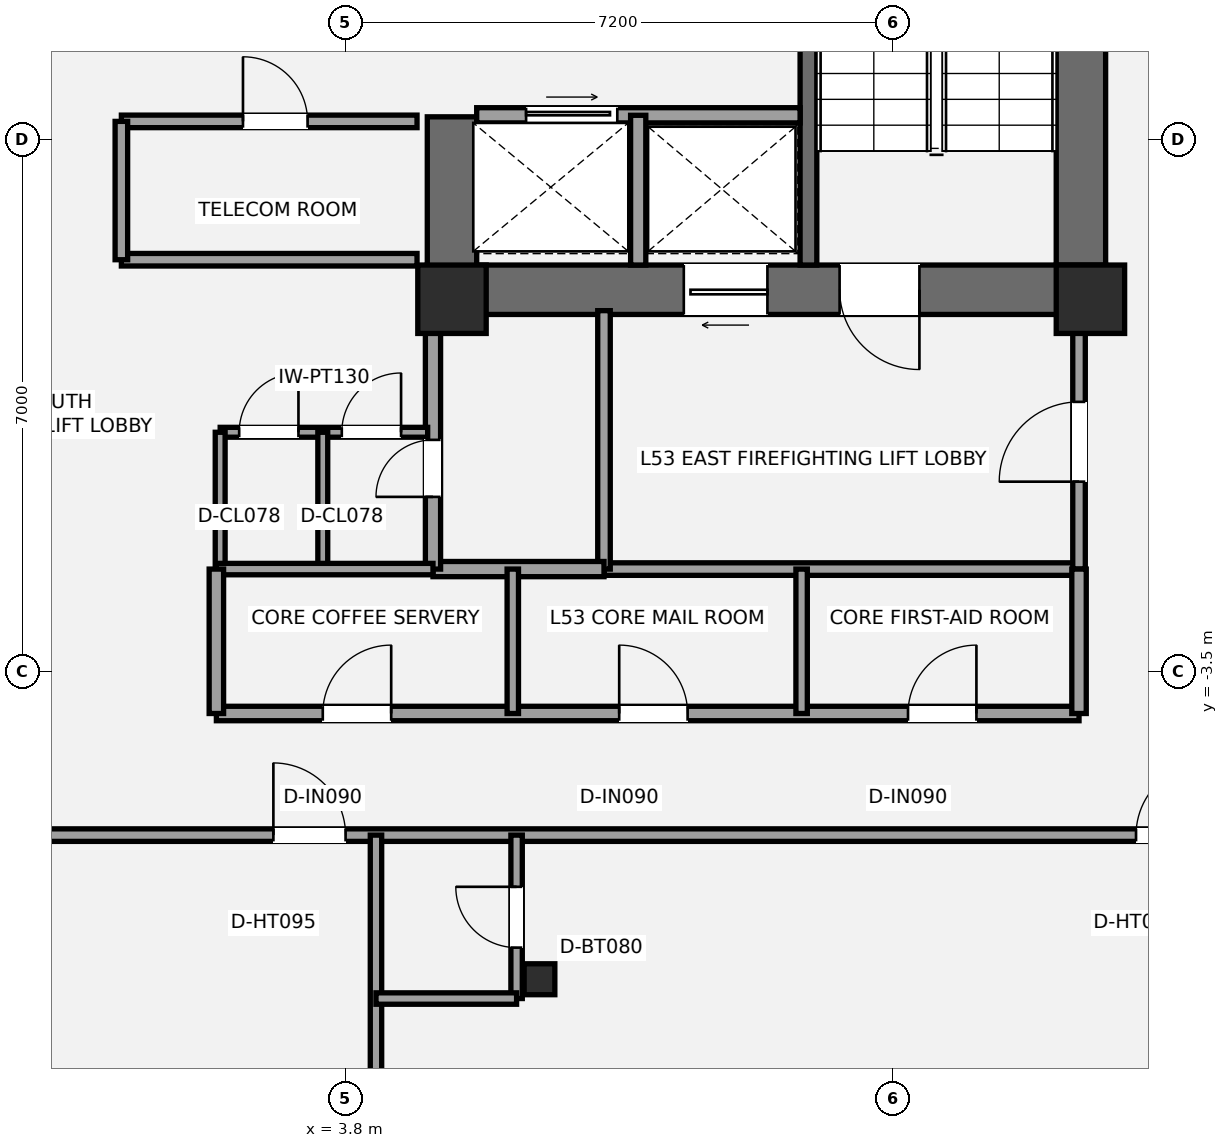
"""IFC4 building model, lengths in metres.
Left out: names, types, materials, properties, quantities, classifications, styles, units other than length and angle.
Written with IfcOpenShell. Run it as: python <this file> out.ifc"""

import sys

from ifc_helpers import new_model, si_unit, direction, frame, frame_2d, origin, origin_2d, place, context, subcontext, project, spatial, rectangle, i_section, extrude, element, fill, save


model = new_model("IFC4")
c1 = context("Model", 3, precision=1e-05, world=origin(), true_north=direction((0.0, 1.0)))
c2 = subcontext(c1, "Body", "Model", "MODEL_VIEW")
j1 = project(units=[si_unit("LENGTHUNIT", "METRE"), si_unit("PLANEANGLEUNIT", "RADIAN")], contexts=[c1])
p1 = place(None, origin())
s1 = spatial("IfcSite", under=j1, at=p1, CompositionType="ELEMENT")
p2 = place(p1, origin())
s2 = spatial("IfcBuilding", under=s1, at=p2, CompositionType="ELEMENT")
p3 = place(p2, frame((0.0, 0.0, 191.8)))
s3 = spatial("IfcBuildingStorey", under=s2, at=p3, CompositionType="ELEMENT", Elevation=191.8)
p4 = place(p3, frame((13.475, 1.2, 0.0), z_axis=(0.0, 0.0, 1.0), x_axis=(0.0, 1.0, 0.0)))
e1 = element("IfcWall", 1, at=p4, inside=s3, PredefinedType="SHEAR", context=c2, shape_type="SweptSolid", body=[
    extrude(rectangle(XDim=8.45, YDim=0.65, at=frame_2d((4.225, 0.0))), origin(), (0.0, 0.0, 1.0), 3.2),
])
p5 = place(p3, frame((13.8, 1.525, 0.0), z_axis=(0.0, 0.0, 1.0), x_axis=(-1.0, 0.0, 0.0)))
e2 = element("IfcWall", 2, at=p5, inside=s3, PredefinedType="SHEAR", context=c2, shape_type="SweptSolid", body=[
    extrude(rectangle(XDim=8.925, YDim=0.65, at=frame_2d((4.462, 0.0))), origin(), (0.0, 0.0, 1.0), 3.2),
])
p6 = place(p5, frame((2.45, 0.0, 0.0)))
e3 = element("IfcOpeningElement", 3, at=p6, cuts=e2, PredefinedType="OPENING", context=c2, shape_type="SweptSolid", body=[
    extrude(rectangle(XDim=1.05, YDim=2.15, at=frame_2d((0.525, 1.075))), frame((0.0, 0.335, 0.0), z_axis=(0.0, -1.0, 0.0), x_axis=(1.0, 0.0, 0.0)), (0.0, 0.0, 1.0), 0.67),
])
p7 = place(p5, frame((4.45, 0.0, 0.0)))
e4 = element("IfcOpeningElement", 4, at=p7, cuts=e2, PredefinedType="OPENING", context=c2, shape_type="SweptSolid", body=[
    extrude(rectangle(XDim=1.1, YDim=2.2, at=frame_2d((0.55, 1.1))), frame((0.0, 0.335, 0.0), z_axis=(0.0, -1.0, 0.0), x_axis=(1.0, 0.0, 0.0)), (0.0, 0.0, 1.0), 0.67),
])
p8 = place(p3, frame((5.2, 1.2, 0.0), z_axis=(0.0, 0.0, 1.0), x_axis=(0.0, 1.0, 0.0)))
e5 = element("IfcWall", 5, at=p8, inside=s3, PredefinedType="SHEAR", context=c2, shape_type="SweptSolid", body=[
    extrude(rectangle(XDim=2.6, YDim=0.65, at=frame_2d((1.3, 0.0))), origin(), (0.0, 0.0, 1.0), 3.2),
])
p9 = place(p3, frame((9.89, 1.85, 0.0), z_axis=(0.0, 0.0, 1.0), x_axis=(0.0, 1.0, 0.0)))
e6 = element("IfcWall", 6, at=p9, inside=s3, PredefinedType="SHEAR", context=c2, shape_type="SweptSolid", body=[
    extrude(rectangle(XDim=7.15, YDim=0.22, at=frame_2d((3.575, 0.0))), origin(), (0.0, 0.0, 1.0), 3.2),
])
for number, where, z_axis, x_axis in (
    (7, (5.2, 1.4, 0.0), (0.0, 0.0, 1.0), (1.0, 0.0, 0.0)),
    (8, (13.6, 1.4, 0.0), (0.0, 0.0, 1.0), (1.0, 0.0, 0.0)),
):
    element("IfcColumn", number, at=place(p3, frame(where, z_axis=z_axis, x_axis=x_axis)), inside=s3, PredefinedType="COLUMN", context=c2, shape_type="SweptSolid", body=[
        extrude(rectangle(XDim=0.9, YDim=0.9, at=origin_2d()), origin(), (0.0, 0.0, 1.0), 3.2),
    ])
p10 = place(p3, frame((6.351, -7.546, 0.0), z_axis=(0.0, 0.0, 1.0), x_axis=(1.0, 0.0, 0.0)))
e9 = element("IfcColumn", 9, at=p10, inside=s3, PredefinedType="COLUMN", context=c2, shape_type="SweptSolid", body=[
    extrude(i_section(OverallWidth=0.404, OverallDepth=0.407, WebThickness=0.027, FlangeThickness=0.044, at=origin_2d()), origin(), (0.0, 0.0, 1.0), 3.2),
])
p11 = place(p3, frame((7.2, -2.15, 0.0), z_axis=(0.0, 0.0, 1.0), x_axis=(1.0, 0.0, 0.0)))
e10 = element("IfcWall", 10, at=p11, inside=s3, PredefinedType="PARTITIONING", context=c2, shape_type="SweptSolid", body=[
    extrude(rectangle(XDim=6.25, YDim=0.165, at=frame_2d((3.125, 0.0))), origin(), (0.0, 0.0, 1.0), 3.02),
])
p12 = place(p3, frame((7.2, -2.15, 0.0), z_axis=(0.0, 0.0, 1.0), x_axis=(0.0, 1.0, 0.0)))
e11 = element("IfcWall", 11, at=p12, inside=s3, PredefinedType="PARTITIONING", context=c2, shape_type="SweptSolid", body=[
    extrude(rectangle(XDim=3.4, YDim=0.165, at=frame_2d((1.7, 0.0))), origin(), (0.0, 0.0, 1.0), 2.473),
])
p13 = place(p3, frame((13.45, -2.15, 0.0), z_axis=(0.0, 0.0, 1.0), x_axis=(0.0, 1.0, 0.0)))
e12 = element("IfcWall", 12, at=p13, inside=s3, PredefinedType="PARTITIONING", context=c2, shape_type="SweptSolid", body=[
    extrude(rectangle(XDim=3.4, YDim=0.165, at=frame_2d((1.7, 0.0))), origin(), (0.0, 0.0, 1.0), 2.473),
])
p14 = place(p13, frame((1.15, 0.0, 0.0)))
e13 = element("IfcOpeningElement", 13, at=p14, cuts=e12, PredefinedType="OPENING", context=c2, shape_type="SweptSolid", body=[
    extrude(rectangle(XDim=1.05, YDim=2.15, at=frame_2d((0.525, 1.075))), frame((0.0, 0.093, 0.0), z_axis=(0.0, -1.0, 0.0), x_axis=(1.0, 0.0, 0.0)), (0.0, 0.0, 1.0), 0.185),
])
p15 = place(p3, frame((4.95, -2.15, 0.0), z_axis=(0.0, 0.0, 1.0), x_axis=(1.0, 0.0, 0.0)))
e14 = element("IfcWall", 14, at=p15, inside=s3, PredefinedType="SOLIDWALL", context=c2, shape_type="SweptSolid", body=[
    extrude(rectangle(XDim=2.25, YDim=0.2, at=frame_2d((1.125, 0.0))), origin(), (0.0, 0.0, 1.0), 3.02),
])
p16 = place(p3, frame((4.95, -2.15, 0.0), z_axis=(0.0, 0.0, 1.0), x_axis=(0.0, 1.0, 0.0)))
e15 = element("IfcWall", 15, at=p16, inside=s3, PredefinedType="SOLIDWALL", context=c2, shape_type="SweptSolid", body=[
    extrude(rectangle(XDim=3.4, YDim=0.2, at=frame_2d((1.7, 0.0))), origin(), (0.0, 0.0, 1.0), 2.473),
])
p17 = place(p16, frame((0.95, 0.0, 0.0)))
e16 = element("IfcOpeningElement", 16, at=p17, cuts=e15, PredefinedType="OPENING", context=c2, shape_type="SweptSolid", body=[
    extrude(rectangle(XDim=0.75, YDim=2.1, at=frame_2d((0.375, 1.05))), frame((0.0, 0.11, 0.0), z_axis=(0.0, -1.0, 0.0), x_axis=(1.0, 0.0, 0.0)), (0.0, 0.0, 1.0), 0.22),
])
p18 = place(p3, frame((2.15, -0.35, 0.0), z_axis=(0.0, 0.0, 1.0), x_axis=(1.0, 0.0, 0.0)))
e17 = element("IfcWall", 17, at=p18, inside=s3, PredefinedType="PARTITIONING", context=c2, shape_type="SweptSolid", body=[
    extrude(rectangle(XDim=2.73, YDim=0.13, at=frame_2d((1.365, 0.0))), origin(), (0.0, 0.0, 1.0), 3.02),
])
p19 = place(p18, frame((0.25, 0.0, 0.0)))
e18 = element("IfcOpeningElement", 18, at=p19, cuts=e17, PredefinedType="OPENING", context=c2, shape_type="SweptSolid", body=[
    extrude(rectangle(XDim=0.78, YDim=2.1, at=frame_2d((0.39, 1.05))), frame((0.0, 0.075, 0.0), z_axis=(0.0, -1.0, 0.0), x_axis=(1.0, 0.0, 0.0)), (0.0, 0.0, 1.0), 0.15),
])
p20 = place(p18, frame((1.6, 0.0, 0.0)))
e19 = element("IfcOpeningElement", 19, at=p20, cuts=e17, PredefinedType="OPENING", context=c2, shape_type="SweptSolid", body=[
    extrude(rectangle(XDim=0.78, YDim=2.1, at=frame_2d((0.39, 1.05))), frame((0.0, 0.075, 0.0), z_axis=(0.0, -1.0, 0.0), x_axis=(1.0, 0.0, 0.0)), (0.0, 0.0, 1.0), 0.15),
])
for number, where, z_axis, x_axis in (
    (20, (2.15, -2.15, 0.0), (0.0, 0.0, 1.0), (0.0, 1.0, 0.0)),
    (21, (3.5, -2.15, 0.0), (0.0, 0.0, 1.0), (0.0, 1.0, 0.0)),
):
    element("IfcWall", number, at=place(p3, frame(where, z_axis=z_axis, x_axis=x_axis)), inside=s3, PredefinedType="PARTITIONING", context=c2, shape_type="SweptSolid", body=[
        extrude(rectangle(XDim=1.8, YDim=0.13, at=frame_2d((0.9, 0.0))), origin(), (0.0, 0.0, 1.0), 3.02),
    ])
p21 = place(p3, frame((5.525, 3.82, 0.0), z_axis=(0.0, 0.0, 1.0), x_axis=(1.0, 0.0, 0.0)))
e22 = element("IfcWall", 22, at=p21, inside=s3, PredefinedType="SOLIDWALL", context=c2, shape_type="SweptSolid", body=[
    extrude(rectangle(XDim=4.255, YDim=0.2, at=frame_2d((2.127, 0.0))), origin(), (0.0, 0.0, 1.0), 3.02),
])
p22 = place(p21, frame((0.65, 0.0, 0.0)))
e23 = element("IfcOpeningElement", 23, at=p22, cuts=e22, PredefinedType="OPENING", context=c2, shape_type="SweptSolid", body=[
    extrude(rectangle(XDim=1.2, YDim=2.2, at=frame_2d((0.6, 1.1))), frame((0.0, 0.11, 0.0), z_axis=(0.0, -1.0, 0.0), x_axis=(1.0, 0.0, 0.0)), (0.0, 0.0, 1.0), 0.22),
])
p23 = place(p3, frame((7.65, 1.85, 0.0), z_axis=(0.0, 0.0, 1.0), x_axis=(0.0, 1.0, 0.0)))
e24 = element("IfcWall", 24, at=p23, inside=s3, PredefinedType="SOLIDWALL", context=c2, shape_type="SweptSolid", body=[
    extrude(rectangle(XDim=1.97, YDim=0.2, at=frame_2d((0.985, 0.0))), origin(), (0.0, 0.0, 1.0), 3.02),
])
p24 = place(p3, frame((0.85, 1.92, 0.0), z_axis=(0.0, 0.0, 1.0), x_axis=(1.0, 0.0, 0.0)))
e25 = element("IfcWall", 25, at=p24, inside=s3, PredefinedType="PARTITIONING", context=c2, shape_type="SweptSolid", body=[
    extrude(rectangle(XDim=3.89, YDim=0.165, at=frame_2d((1.945, 0.0))), origin(), (0.0, 0.0, 1.0), 2.16),
])
p25 = place(p3, frame((0.85, 3.74, 0.0), z_axis=(0.0, 0.0, 1.0), x_axis=(1.0, 0.0, 0.0)))
e26 = element("IfcWall", 26, at=p25, inside=s3, PredefinedType="PARTITIONING", context=c2, shape_type="SweptSolid", body=[
    extrude(rectangle(XDim=3.89, YDim=0.165, at=frame_2d((1.945, 0.0))), origin(), (0.0, 0.0, 1.0), 3.02),
])
p26 = place(p25, frame((1.6, 0.0, 0.0)))
e27 = element("IfcOpeningElement", 27, at=p26, cuts=e26, PredefinedType="OPENING", context=c2, shape_type="SweptSolid", body=[
    extrude(rectangle(XDim=0.85, YDim=2.1, at=frame_2d((0.425, 1.05))), frame((0.0, 0.093, 0.0), z_axis=(0.0, -1.0, 0.0), x_axis=(1.0, 0.0, 0.0)), (0.0, 0.0, 1.0), 0.185),
])
p27 = place(p3, frame((0.85, 1.92, 0.0), z_axis=(0.0, 0.0, 1.0), x_axis=(0.0, 1.0, 0.0)))
e28 = element("IfcWall", 28, at=p27, inside=s3, PredefinedType="PARTITIONING", context=c2, shape_type="SweptSolid", body=[
    extrude(rectangle(XDim=1.82, YDim=0.165, at=frame_2d((0.91, 0.0))), origin(), (0.0, 0.0, 1.0), 3.02),
])
p28 = place(p3, frame((2.1, -4.05, 0.0), z_axis=(0.0, 0.0, 1.0), x_axis=(1.0, 0.0, 0.0)))
e29 = element("IfcWall", 29, at=p28, inside=s3, PredefinedType="PLUMBINGWALL", context=c2, shape_type="SweptSolid", body=[
    extrude(rectangle(XDim=11.35, YDim=0.19, at=frame_2d((5.675, 0.0))), origin(), (0.0, 0.0, 1.0), 2.555),
])
p29 = place(p28, frame((1.4, 0.0, 0.0)))
e30 = element("IfcOpeningElement", 30, at=p29, cuts=e29, PredefinedType="OPENING", context=c2, shape_type="SweptSolid", body=[
    extrude(rectangle(XDim=0.9, YDim=2.1, at=frame_2d((0.45, 1.05))), frame((0.0, 0.105, 0.0), z_axis=(0.0, -1.0, 0.0), x_axis=(1.0, 0.0, 0.0)), (0.0, 0.0, 1.0), 0.21),
])
p30 = place(p28, frame((5.3, 0.0, 0.0)))
e31 = element("IfcOpeningElement", 31, at=p30, cuts=e29, PredefinedType="OPENING", context=c2, shape_type="SweptSolid", body=[
    extrude(rectangle(XDim=0.9, YDim=2.1, at=frame_2d((0.45, 1.05))), frame((0.0, 0.105, 0.0), z_axis=(0.0, -1.0, 0.0), x_axis=(1.0, 0.0, 0.0)), (0.0, 0.0, 1.0), 0.21),
])
p31 = place(p28, frame((9.1, 0.0, 0.0)))
e32 = element("IfcOpeningElement", 32, at=p31, cuts=e29, PredefinedType="OPENING", context=c2, shape_type="SweptSolid", body=[
    extrude(rectangle(XDim=0.9, YDim=2.1, at=frame_2d((0.45, 1.05))), frame((0.0, 0.105, 0.0), z_axis=(0.0, -1.0, 0.0), x_axis=(1.0, 0.0, 0.0)), (0.0, 0.0, 1.0), 0.21),
])
p32 = place(p3, frame((2.1, -2.15, 0.0), z_axis=(0.0, 0.0, 1.0), x_axis=(1.0, 0.0, 0.0)))
e33 = element("IfcWall", 33, at=p32, inside=s3, PredefinedType="PLUMBINGWALL", context=c2, shape_type="SweptSolid", body=[
    extrude(rectangle(XDim=2.85, YDim=0.15, at=frame_2d((1.425, 0.0))), origin(), (0.0, 0.0, 1.0), 3.02),
])
p33 = place(p3, frame((2.1, -4.05, 0.0), z_axis=(0.0, 0.0, 1.0), x_axis=(0.0, 1.0, 0.0)))
e34 = element("IfcWall", 34, at=p33, inside=s3, PredefinedType="PLUMBINGWALL", context=c2, shape_type="SweptSolid", body=[
    extrude(rectangle(XDim=1.9, YDim=0.19, at=frame_2d((0.95, 0.0))), origin(), (0.0, 0.0, 1.0), 3.02),
])
p34 = place(p3, frame((13.45, -4.05, 0.0), z_axis=(0.0, 0.0, 1.0), x_axis=(0.0, 1.0, 0.0)))
e35 = element("IfcWall", 35, at=p34, inside=s3, PredefinedType="PLUMBINGWALL", context=c2, shape_type="SweptSolid", body=[
    extrude(rectangle(XDim=1.9, YDim=0.19, at=frame_2d((0.95, 0.0))), origin(), (0.0, 0.0, 1.0), 2.473),
])
for number, where, z_axis, x_axis in (
    (36, (6.0, -4.05, 0.0), (0.0, 0.0, 1.0), (0.0, 1.0, 0.0)),
    (37, (9.8, -4.05, 0.0), (0.0, 0.0, 1.0), (0.0, 1.0, 0.0)),
):
    element("IfcWall", number, at=place(p3, frame(where, z_axis=z_axis, x_axis=x_axis)), inside=s3, PredefinedType="PLUMBINGWALL", context=c2, shape_type="SweptSolid", body=[
        extrude(rectangle(XDim=1.9, YDim=0.15, at=frame_2d((0.95, 0.0))), origin(), (0.0, 0.0, 1.0), 2.473),
    ])
p35 = place(p3, frame((-16.1, -5.65, 0.0), z_axis=(0.0, 0.0, 1.0), x_axis=(1.0, 0.0, 0.0)))
e38 = element("IfcWall", 38, at=p35, inside=s3, PredefinedType="PARTITIONING", context=c2, shape_type="SweptSolid", body=[
    extrude(rectangle(XDim=31.65, YDim=0.165, at=frame_2d((15.825, 0.0))), origin(), (0.0, 0.0, 1.0), 2.398),
])
p36 = place(p35, frame((8.95, 0.0, 0.0)))
e39 = element("IfcOpeningElement", 39, at=p36, cuts=e38, PredefinedType="OPENING", context=c2, shape_type="SweptSolid", body=[
    extrude(rectangle(XDim=0.95, YDim=2.15, at=frame_2d((0.475, 1.075))), frame((0.0, 0.093, 0.0), z_axis=(0.0, -1.0, 0.0), x_axis=(1.0, 0.0, 0.0)), (0.0, 0.0, 1.0), 0.185),
])
p37 = place(p35, frame((18.95, 0.0, 0.0)))
e40 = element("IfcOpeningElement", 40, at=p37, cuts=e38, PredefinedType="OPENING", context=c2, shape_type="SweptSolid", body=[
    extrude(rectangle(XDim=0.95, YDim=2.15, at=frame_2d((0.475, 1.075))), frame((0.0, 0.093, 0.0), z_axis=(0.0, -1.0, 0.0), x_axis=(1.0, 0.0, 0.0)), (0.0, 0.0, 1.0), 0.185),
])
p38 = place(p35, frame((30.3, 0.0, 0.0)))
e41 = element("IfcOpeningElement", 41, at=p38, cuts=e38, PredefinedType="OPENING", context=c2, shape_type="SweptSolid", body=[
    extrude(rectangle(XDim=0.95, YDim=2.15, at=frame_2d((0.475, 1.075))), frame((0.0, 0.093, 0.0), z_axis=(0.0, -1.0, 0.0), x_axis=(1.0, 0.0, 0.0)), (0.0, 0.0, 1.0), 0.185),
])
p39 = place(p3, frame((4.2, -15.729, 0.0), z_axis=(0.0, 0.0, 1.0), x_axis=(0.0, 1.0, 0.0)))
e42 = element("IfcWall", 42, at=p39, inside=s3, PredefinedType="PLUMBINGWALL", context=c2, shape_type="SweptSolid", body=[
    extrude(rectangle(XDim=10.08, YDim=0.15, at=frame_2d((5.04, 0.0))), origin(), (0.0, 0.0, 1.0), 2.473),
])
p40 = place(p3, frame((6.05, -7.8, 0.0), z_axis=(0.0, 0.0, 1.0), x_axis=(0.0, 1.0, 0.0)))
e43 = element("IfcWall", 43, at=p40, inside=s3, PredefinedType="PLUMBINGWALL", context=c2, shape_type="SweptSolid", body=[
    extrude(rectangle(XDim=2.15, YDim=0.15, at=frame_2d((1.075, 0.0))), origin(), (0.0, 0.0, 1.0), 2.473),
])
p41 = place(p40, frame((0.67, 0.0, 0.0)))
e44 = element("IfcOpeningElement", 44, at=p41, cuts=e43, PredefinedType="OPENING", context=c2, shape_type="SweptSolid", body=[
    extrude(rectangle(XDim=0.8, YDim=2.1, at=frame_2d((0.4, 1.05))), frame((0.0, 0.085, 0.0), z_axis=(0.0, -1.0, 0.0), x_axis=(1.0, 0.0, 0.0)), (0.0, 0.0, 1.0), 0.17),
])
p42 = place(p3, frame((4.2, -7.8, 0.0), z_axis=(0.0, 0.0, 1.0), x_axis=(1.0, 0.0, 0.0)))
e45 = element("IfcWall", 45, at=p42, inside=s3, PredefinedType="PLUMBINGWALL", context=c2, shape_type="SweptSolid", body=[
    extrude(rectangle(XDim=1.85, YDim=0.15, at=frame_2d((0.925, 0.0))), origin(), (0.0, 0.0, 1.0), 3.02),
])
p43 = place(p6, origin())
e46 = element("IfcDoor", 46, at=p43, inside=s3, OperationType="SINGLE_SWING_LEFT", PredefinedType="DOOR", context=c2, shape_type="SweptSolid", body=[
    extrude(rectangle(XDim=1.05, YDim=2.15, at=frame_2d((0.525, 1.075))), frame((0.0, 0.025, 0.0), z_axis=(0.0, -1.0, 0.0), x_axis=(1.0, 0.0, 0.0)), (0.0, 0.0, 1.0), 0.05),
])
fill(e3, e46)
p44 = place(p14, origin())
e47 = element("IfcDoor", 47, at=p44, inside=s3, OperationType="SINGLE_SWING_LEFT", PredefinedType="DOOR", context=c2, shape_type="SweptSolid", body=[
    extrude(rectangle(XDim=1.05, YDim=2.15, at=frame_2d((0.525, 1.075))), frame((0.0, 0.025, 0.0), z_axis=(0.0, -1.0, 0.0), x_axis=(1.0, 0.0, 0.0)), (0.0, 0.0, 1.0), 0.05),
])
fill(e13, e47)
p45 = place(p17, origin())
e48 = element("IfcDoor", 48, at=p45, inside=s3, OperationType="SINGLE_SWING_LEFT", PredefinedType="DOOR", context=c2, shape_type="SweptSolid", body=[
    extrude(rectangle(XDim=0.75, YDim=2.1, at=frame_2d((0.375, 1.05))), frame((0.0, 0.025, 0.0), z_axis=(0.0, -1.0, 0.0), x_axis=(1.0, 0.0, 0.0)), (0.0, 0.0, 1.0), 0.05),
])
fill(e16, e48)
p46 = place(p19, origin())
e49 = element("IfcDoor", 49, at=p46, inside=s3, OperationType="SINGLE_SWING_RIGHT", PredefinedType="DOOR", context=c2, shape_type="SweptSolid", body=[
    extrude(rectangle(XDim=0.78, YDim=2.1, at=frame_2d((0.39, 1.05))), frame((0.0, 0.025, 0.0), z_axis=(0.0, -1.0, 0.0), x_axis=(1.0, 0.0, 0.0)), (0.0, 0.0, 1.0), 0.05),
])
fill(e18, e49)
p47 = place(p20, origin())
e50 = element("IfcDoor", 50, at=p47, inside=s3, OperationType="SINGLE_SWING_RIGHT", PredefinedType="DOOR", context=c2, shape_type="SweptSolid", body=[
    extrude(rectangle(XDim=0.78, YDim=2.1, at=frame_2d((0.39, 1.05))), frame((0.0, 0.025, 0.0), z_axis=(0.0, -1.0, 0.0), x_axis=(1.0, 0.0, 0.0)), (0.0, 0.0, 1.0), 0.05),
])
fill(e19, e50)
p48 = place(p7, origin())
e51 = element("IfcDoor", 51, at=p48, inside=s3, OperationType="SLIDING_TO_LEFT", PredefinedType="DOOR", context=c2, shape_type="SweptSolid", body=[
    extrude(rectangle(XDim=1.1, YDim=2.2, at=frame_2d((0.55, 1.1))), frame((0.0, 0.025, 0.0), z_axis=(0.0, -1.0, 0.0), x_axis=(1.0, 0.0, 0.0)), (0.0, 0.0, 1.0), 0.05),
])
fill(e4, e51)
p49 = place(p22, origin())
e52 = element("IfcDoor", 52, at=p49, inside=s3, OperationType="SLIDING_TO_RIGHT", PredefinedType="DOOR", context=c2, shape_type="SweptSolid", body=[
    extrude(rectangle(XDim=1.2, YDim=2.2, at=frame_2d((0.6, 1.1))), frame((0.0, 0.025, 0.0), z_axis=(0.0, -1.0, 0.0), x_axis=(1.0, 0.0, 0.0)), (0.0, 0.0, 1.0), 0.05),
])
fill(e23, e52)
p50 = place(p26, origin())
e53 = element("IfcDoor", 53, at=p50, inside=s3, OperationType="SINGLE_SWING_LEFT", PredefinedType="DOOR", context=c2, shape_type="SweptSolid", body=[
    extrude(rectangle(XDim=0.85, YDim=2.1, at=frame_2d((0.425, 1.05))), frame((0.0, 0.025, 0.0), z_axis=(0.0, -1.0, 0.0), x_axis=(1.0, 0.0, 0.0)), (0.0, 0.0, 1.0), 0.05),
])
fill(e27, e53)
p51 = place(p29, origin())
e54 = element("IfcDoor", 54, at=p51, inside=s3, OperationType="SINGLE_SWING_RIGHT", PredefinedType="DOOR", context=c2, shape_type="SweptSolid", body=[
    extrude(rectangle(XDim=0.9, YDim=2.1, at=frame_2d((0.45, 1.05))), frame((0.0, 0.025, 0.0), z_axis=(0.0, -1.0, 0.0), x_axis=(1.0, 0.0, 0.0)), (0.0, 0.0, 1.0), 0.05),
])
fill(e30, e54)
p52 = place(p30, origin())
e55 = element("IfcDoor", 55, at=p52, inside=s3, OperationType="SINGLE_SWING_LEFT", PredefinedType="DOOR", context=c2, shape_type="SweptSolid", body=[
    extrude(rectangle(XDim=0.9, YDim=2.1, at=frame_2d((0.45, 1.05))), frame((0.0, 0.025, 0.0), z_axis=(0.0, -1.0, 0.0), x_axis=(1.0, 0.0, 0.0)), (0.0, 0.0, 1.0), 0.05),
])
fill(e31, e55)
p53 = place(p31, origin())
e56 = element("IfcDoor", 56, at=p53, inside=s3, OperationType="SINGLE_SWING_RIGHT", PredefinedType="DOOR", context=c2, shape_type="SweptSolid", body=[
    extrude(rectangle(XDim=0.9, YDim=2.1, at=frame_2d((0.45, 1.05))), frame((0.0, 0.025, 0.0), z_axis=(0.0, -1.0, 0.0), x_axis=(1.0, 0.0, 0.0)), (0.0, 0.0, 1.0), 0.05),
])
fill(e32, e56)
p54 = place(p37, origin())
e57 = element("IfcDoor", 57, at=p54, inside=s3, OperationType="SINGLE_SWING_LEFT", PredefinedType="DOOR", context=c2, shape_type="SweptSolid", body=[
    extrude(rectangle(XDim=0.95, YDim=2.15, at=frame_2d((0.475, 1.075))), frame((0.0, 0.025, 0.0), z_axis=(0.0, -1.0, 0.0), x_axis=(1.0, 0.0, 0.0)), (0.0, 0.0, 1.0), 0.05),
])
fill(e40, e57)
p55 = place(p38, origin())
e58 = element("IfcDoor", 58, at=p55, inside=s3, OperationType="SINGLE_SWING_RIGHT", PredefinedType="DOOR", context=c2, shape_type="SweptSolid", body=[
    extrude(rectangle(XDim=0.95, YDim=2.15, at=frame_2d((0.475, 1.075))), frame((0.0, 0.025, 0.0), z_axis=(0.0, -1.0, 0.0), x_axis=(1.0, 0.0, 0.0)), (0.0, 0.0, 1.0), 0.05),
])
fill(e41, e58)
p56 = place(p41, origin())
e59 = element("IfcDoor", 59, at=p56, inside=s3, OperationType="SINGLE_SWING_RIGHT", PredefinedType="DOOR", context=c2, shape_type="SweptSolid", body=[
    extrude(rectangle(XDim=0.8, YDim=2.1, at=frame_2d((0.4, 1.05))), frame((0.0, 0.025, 0.0), z_axis=(0.0, -1.0, 0.0), x_axis=(1.0, 0.0, 0.0)), (0.0, 0.0, 1.0), 0.05),
])
fill(e44, e59)
save(model, sys.argv[1])
